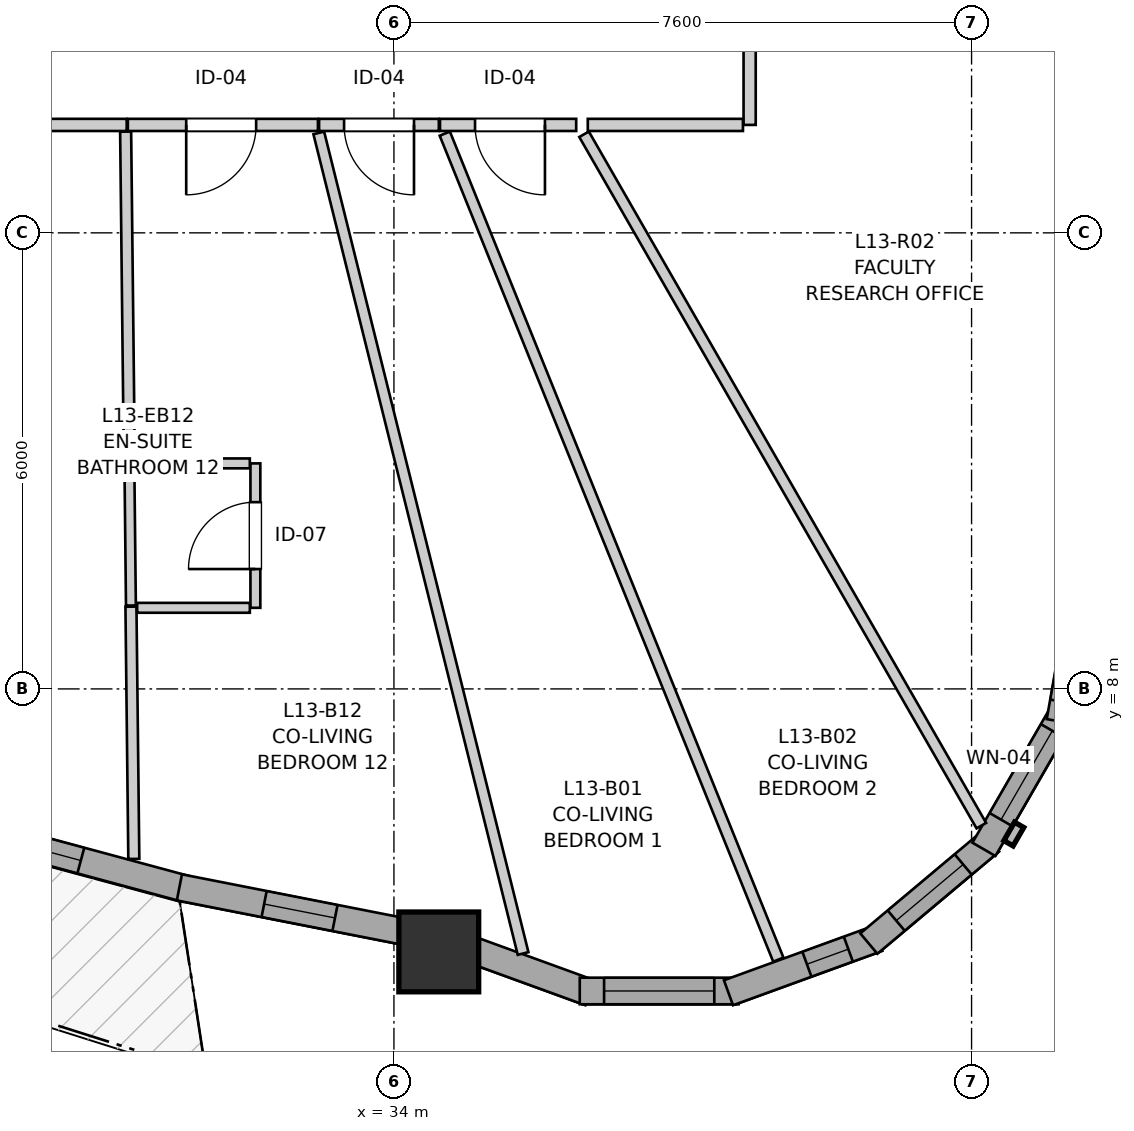
"""IFC4 building model, lengths in metres.
Left out: names, types, materials, properties, quantities, classifications, styles, units other than length and angle.
Written with IfcOpenShell. Run it as: python <this file> out.ifc"""

import sys

from ifc_helpers import new_model, si_unit, direction, frame, frame_2d, origin, origin_2d, place, context, subcontext, project, spatial, rectangle, extrude, source, transform, mapped, element, fill, save


model = new_model("IFC4")
c1 = context("Model", 3, precision=1e-05, world=origin(), true_north=direction((0.0, 1.0)))
c2 = subcontext(c1, "Body", "Model", "MODEL_VIEW")
j1 = project(units=[si_unit("LENGTHUNIT", "METRE"), si_unit("PLANEANGLEUNIT", "RADIAN")], contexts=[c1])
p1 = place(None, origin())
s1 = spatial("IfcSite", under=j1, at=p1, CompositionType="ELEMENT")
p2 = place(p1, origin())
s2 = spatial("IfcBuilding", under=s1, at=p2, CompositionType="ELEMENT")
p3 = place(p2, frame((0.0, 0.0, 46.2)))
s3 = spatial("IfcBuildingStorey", under=s2, at=p3, CompositionType="ELEMENT", Elevation=46.2)
m1 = source(origin(), c2, "Body", "SweptSolid", [
    extrude(rectangle(XDim=1.05, YDim=1.05, at=origin_2d()), origin(), (0.0, 0.0, 1.0), 2.94),
])
p4 = place(p3, frame((34.59, 4.54, 0.0), z_axis=(0.0, 0.0, 1.0), x_axis=(1.0, 0.0, 0.0)))
e1 = element("IfcColumn", 1, at=p4, inside=s3, PredefinedType="COLUMN", context=c2, shape_type="MappedRepresentation", body=[
    mapped(m1, transform((0.0, 0.0, 0.0), x_axis=(1.0, 0.0, 0.0), y_axis=(0.0, 1.0, 0.0), z_axis=(0.0, 0.0, 1.0), scale=1.0)),
])
p5 = place(p3, frame((27.961, 6.26, 0.0), z_axis=(0.0, 0.0, 1.0), x_axis=(0.96545566601, -0.260567375106, 0.0)))
e2 = element("IfcWall", 2, at=p5, inside=s3, PredefinedType="SOLIDWALL", context=c2, shape_type="SweptSolid", body=[
    extrude(rectangle(XDim=3.42, YDim=0.35, at=frame_2d((1.71, 0.0))), origin(), (0.0, 0.0, 1.0), 2.42),
])
p6 = place(p5, frame((0.738, 0.0, 0.82)))
e3 = element("IfcOpeningElement", 3, at=p6, cuts=e2, PredefinedType="OPENING", context=c2, shape_type="SweptSolid", body=[
    extrude(rectangle(XDim=1.25, YDim=1.35, at=frame_2d((0.625, 0.675))), frame((0.0, 0.185, 0.0), z_axis=(0.0, -1.0, 0.0), x_axis=(1.0, 0.0, 0.0)), (0.0, 0.0, 1.0), 0.37),
])
p7 = place(p3, frame((31.177, 5.389, 0.0), z_axis=(0.0, 0.0, 1.0), x_axis=(0.981235727687, -0.192811946491, 0.0)))
e4 = element("IfcWall", 4, at=p7, inside=s3, PredefinedType="SOLIDWALL", context=c2, shape_type="SweptSolid", body=[
    extrude(rectangle(XDim=3.212, YDim=0.35, at=frame_2d((1.606, 0.0))), origin(), (0.0, 0.0, 1.0), 2.42),
])
p8 = place(p7, frame((1.136, 0.0, 0.82)))
e5 = element("IfcOpeningElement", 5, at=p8, cuts=e4, PredefinedType="OPENING", context=c2, shape_type="SweptSolid", body=[
    extrude(rectangle(XDim=0.95, YDim=1.35, at=frame_2d((0.475, 0.675))), frame((0.0, 0.185, 0.0), z_axis=(0.0, -1.0, 0.0), x_axis=(1.0, 0.0, 0.0)), (0.0, 0.0, 1.0), 0.37),
])
p9 = place(p3, frame((34.932, 4.602, 0.0), z_axis=(0.0, 0.0, 1.0), x_axis=(0.939675390388, -0.342067479745, 0.0)))
e6 = element("IfcWall", 6, at=p9, inside=s3, PredefinedType="SOLIDWALL", context=c2, shape_type="SweptSolid", body=[
    extrude(rectangle(XDim=1.752, YDim=0.35, at=frame_2d((0.876, 0.0))), origin(), (0.0, 0.0, 1.0), 2.42),
])
p10 = place(p3, frame((36.445, 4.026, 0.0), z_axis=(0.0, 0.0, 1.0), x_axis=(1.0, 0.0, 0.0)))
e7 = element("IfcWall", 7, at=p10, inside=s3, PredefinedType="SOLIDWALL", context=c2, shape_type="SweptSolid", body=[
    extrude(rectangle(XDim=2.09, YDim=0.35, at=frame_2d((1.045, 0.0))), origin(), (0.0, 0.0, 1.0), 2.42),
])
p11 = place(p10, frame((0.32, 0.0, 0.82)))
e8 = element("IfcOpeningElement", 8, at=p11, cuts=e7, PredefinedType="OPENING", context=c2, shape_type="SweptSolid", body=[
    extrude(rectangle(XDim=1.45, YDim=1.25, at=frame_2d((0.725, 0.625))), frame((0.0, 0.185, 0.0), z_axis=(0.0, -1.0, 0.0), x_axis=(1.0, 0.0, 0.0)), (0.0, 0.0, 1.0), 0.37),
])
p12 = place(p3, frame((38.402, 4.002, 0.0), z_axis=(0.0, 0.0, 1.0), x_axis=(0.939711556618, 0.341968113072, 0.0)))
e9 = element("IfcWall", 9, at=p12, inside=s3, PredefinedType="SOLIDWALL", context=c2, shape_type="SweptSolid", body=[
    extrude(rectangle(XDim=2.09, YDim=0.35, at=frame_2d((1.045, 0.0))), origin(), (0.0, 0.0, 1.0), 2.42),
])
p13 = place(p12, frame((1.098, 0.0, 0.82)))
e10 = element("IfcOpeningElement", 10, at=p13, cuts=e9, PredefinedType="OPENING", context=c2, shape_type="SweptSolid", body=[
    extrude(rectangle(XDim=0.58, YDim=1.35, at=frame_2d((0.29, 0.675))), frame((0.0, 0.185, 0.0), z_axis=(0.0, -1.0, 0.0), x_axis=(1.0, 0.0, 0.0)), (0.0, 0.0, 1.0), 0.37),
])
p14 = place(p3, frame((40.248, 4.649, 0.0), z_axis=(0.0, 0.0, 1.0), x_axis=(0.766024572719, 0.642811289563, 0.0)))
e11 = element("IfcWall", 11, at=p14, inside=s3, PredefinedType="SOLIDWALL", context=c2, shape_type="SweptSolid", body=[
    extrude(rectangle(XDim=2.09, YDim=0.35, at=frame_2d((1.045, 0.0))), origin(), (0.0, 0.0, 1.0), 2.42),
])
p15 = place(p14, frame((0.47, 0.0, 0.82)))
e12 = element("IfcOpeningElement", 12, at=p15, cuts=e11, PredefinedType="OPENING", context=c2, shape_type="SweptSolid", body=[
    extrude(rectangle(XDim=1.15, YDim=1.2, at=frame_2d((0.575, 0.6))), frame((0.0, 0.185, 0.0), z_axis=(0.0, -1.0, 0.0), x_axis=(1.0, 0.0, 0.0)), (0.0, 0.0, 1.0), 0.37),
])
p16 = place(p3, frame((41.762, 5.889, 0.0), z_axis=(0.0, 0.0, 1.0), x_axis=(0.500046000743, 0.865998843614, 0.0)))
e13 = element("IfcWall", 13, at=p16, inside=s3, PredefinedType="SOLIDWALL", context=c2, shape_type="SweptSolid", body=[
    extrude(rectangle(XDim=2.09, YDim=0.35, at=frame_2d((1.045, 0.0))), origin(), (0.0, 0.0, 1.0), 2.42),
])
p17 = place(p16, frame((0.451, 0.0, 0.82)))
e14 = element("IfcOpeningElement", 14, at=p17, cuts=e13, PredefinedType="OPENING", context=c2, shape_type="SweptSolid", body=[
    extrude(rectangle(XDim=1.35, YDim=1.45, at=frame_2d((0.675, 0.725))), frame((0.0, 0.185, 0.0), z_axis=(0.0, -1.0, 0.0), x_axis=(1.0, 0.0, 0.0)), (0.0, 0.0, 1.0), 0.37),
])
p18 = place(p3, frame((42.761, 7.572, 0.0), z_axis=(0.0, 0.0, 1.0), x_axis=(0.17370309897, 0.984798067326, 0.0)))
e15 = element("IfcWall", 15, at=p18, inside=s3, PredefinedType="SOLIDWALL", context=c2, shape_type="SweptSolid", body=[
    extrude(rectangle(XDim=2.032, YDim=0.35, at=frame_2d((1.016, 0.0))), origin(), (0.0, 0.0, 1.0), 2.42),
])
p19 = place(p18, frame((0.261, 0.0, 0.82)))
e16 = element("IfcOpeningElement", 16, at=p19, cuts=e15, PredefinedType="OPENING", context=c2, shape_type="SweptSolid", body=[
    extrude(rectangle(XDim=1.45, YDim=1.25, at=frame_2d((0.725, 0.625))), frame((0.0, 0.185, 0.0), z_axis=(0.0, -1.0, 0.0), x_axis=(1.0, 0.0, 0.0)), (0.0, 0.0, 1.0), 0.37),
])
p20 = place(p3, frame((38.68, 21.086, 0.0), z_axis=(0.0, 0.0, 1.0), x_axis=(0.0, -1.0, 0.0)))
e17 = element("IfcWall", 17, at=p20, inside=s3, PredefinedType="PARTITIONING", context=c2, shape_type="SweptSolid", body=[
    extrude(rectangle(XDim=5.666, YDim=0.16, at=frame_2d((2.833, 0.0))), origin(), (0.0, 0.0, 1.0), 2.94),
])
p21 = place(p20, frame((2.362, 0.0, 0.0)))
e18 = element("IfcOpeningElement", 18, at=p21, cuts=e17, PredefinedType="OPENING", context=c2, shape_type="SweptSolid", body=[
    extrude(rectangle(XDim=0.96, YDim=2.1, at=frame_2d((0.48, 1.05))), frame((0.0, 0.09, 0.0), z_axis=(0.0, -1.0, 0.0), x_axis=(1.0, 0.0, 0.0)), (0.0, 0.0, 1.0), 0.18),
])
p22 = place(p3, frame((30.484, 15.42, 0.0), z_axis=(0.0, 0.0, 1.0), x_axis=(-1.0, 0.0, 0.0)))
e19 = element("IfcWall", 19, at=p22, inside=s3, PredefinedType="PARTITIONING", context=c2, shape_type="SweptSolid", body=[
    extrude(rectangle(XDim=2.925, YDim=0.16, at=frame_2d((1.462, 0.0))), origin(), (0.0, 0.0, 1.0), 2.94),
])
p23 = place(p22, frame((1.025, 0.0, 0.0)))
e20 = element("IfcOpeningElement", 20, at=p23, cuts=e19, PredefinedType="OPENING", context=c2, shape_type="SweptSolid", body=[
    extrude(rectangle(XDim=0.92, YDim=2.1, at=frame_2d((0.46, 1.05))), frame((0.0, 0.09, 0.0), z_axis=(0.0, -1.0, 0.0), x_axis=(1.0, 0.0, 0.0)), (0.0, 0.0, 1.0), 0.18),
])
p24 = place(p3, frame((33.0, 15.42, 0.0), z_axis=(0.0, 0.0, 1.0), x_axis=(-1.0, 0.0, 0.0)))
e21 = element("IfcWall", 21, at=p24, inside=s3, PredefinedType="PARTITIONING", context=c2, shape_type="SweptSolid", body=[
    extrude(rectangle(XDim=2.501, YDim=0.16, at=frame_2d((1.25, 0.0))), origin(), (0.0, 0.0, 1.0), 2.94),
])
p25 = place(p24, frame((0.813, 0.0, 0.0)))
e22 = element("IfcOpeningElement", 22, at=p25, cuts=e21, PredefinedType="OPENING", context=c2, shape_type="SweptSolid", body=[
    extrude(rectangle(XDim=0.92, YDim=2.1, at=frame_2d((0.46, 1.05))), frame((0.0, 0.09, 0.0), z_axis=(0.0, -1.0, 0.0), x_axis=(1.0, 0.0, 0.0)), (0.0, 0.0, 1.0), 0.18),
])
p26 = place(p3, frame((32.177, 9.067, 0.0), z_axis=(0.0, 0.0, 1.0), x_axis=(0.0, 1.0, 0.0)))
e23 = element("IfcWall", 23, at=p26, inside=s3, PredefinedType="PARTITIONING", context=c2, shape_type="SweptSolid", body=[
    extrude(rectangle(XDim=1.9, YDim=0.13, at=frame_2d((0.95, 0.0))), origin(), (0.0, 0.0, 1.0), 2.94),
])
p27 = place(p26, frame((0.51, 0.0, 0.0)))
e24 = element("IfcOpeningElement", 24, at=p27, cuts=e23, PredefinedType="OPENING", context=c2, shape_type="SweptSolid", body=[
    extrude(rectangle(XDim=0.88, YDim=2.05, at=frame_2d((0.44, 1.025))), frame((0.0, 0.075, 0.0), z_axis=(0.0, -1.0, 0.0), x_axis=(1.0, 0.0, 0.0)), (0.0, 0.0, 1.0), 0.15),
])
p28 = place(p3, frame((36.398, 15.42, 0.0), z_axis=(0.0, 0.0, 1.0), x_axis=(-1.0, 0.0, 0.0)))
e25 = element("IfcWall", 25, at=p28, inside=s3, PredefinedType="PARTITIONING", context=c2, shape_type="SweptSolid", body=[
    extrude(rectangle(XDim=1.792, YDim=0.16, at=frame_2d((0.896, 0.0))), origin(), (0.0, 0.0, 1.0), 2.94),
])
p29 = place(p28, frame((0.411, 0.0, 0.0)))
e26 = element("IfcOpeningElement", 26, at=p29, cuts=e25, PredefinedType="OPENING", context=c2, shape_type="SweptSolid", body=[
    extrude(rectangle(XDim=0.92, YDim=2.1, at=frame_2d((0.46, 1.05))), frame((0.0, 0.09, 0.0), z_axis=(0.0, -1.0, 0.0), x_axis=(1.0, 0.0, 0.0)), (0.0, 0.0, 1.0), 0.18),
])
p30 = place(p3, frame((34.591, 15.42, 0.0), z_axis=(0.0, 0.0, 1.0), x_axis=(-1.0, 0.0, 0.0)))
e27 = element("IfcWall", 27, at=p30, inside=s3, PredefinedType="PARTITIONING", context=c2, shape_type="SweptSolid", body=[
    extrude(rectangle(XDim=1.576, YDim=0.16, at=frame_2d((0.788, 0.0))), origin(), (0.0, 0.0, 1.0), 2.94),
])
p31 = place(p30, frame((0.327, 0.0, 0.0)))
e28 = element("IfcOpeningElement", 28, at=p31, cuts=e27, PredefinedType="OPENING", context=c2, shape_type="SweptSolid", body=[
    extrude(rectangle(XDim=0.92, YDim=2.1, at=frame_2d((0.46, 1.05))), frame((0.0, 0.09, 0.0), z_axis=(0.0, -1.0, 0.0), x_axis=(1.0, 0.0, 0.0)), (0.0, 0.0, 1.0), 0.18),
])
p32 = place(p3, frame((34.669, 15.305, 0.0), z_axis=(0.0, 0.0, 1.0), x_axis=(0.374459605158, -0.927243228126, 0.0)))
e29 = element("IfcWall", 29, at=p32, inside=s3, PredefinedType="PARTITIONING", context=c2, shape_type="SweptSolid", body=[
    extrude(rectangle(XDim=11.719, YDim=0.145, at=frame_2d((5.86, 0.0))), origin(), (0.0, 0.0, 1.0), 2.94),
])
p33 = place(p3, frame((33.011, 15.315, 0.0), z_axis=(0.0, 0.0, 1.0), x_axis=(0.241616400535, -0.970371843673, 0.0)))
e30 = element("IfcWall", 30, at=p33, inside=s3, PredefinedType="PARTITIONING", context=c2, shape_type="SweptSolid", body=[
    extrude(rectangle(XDim=11.125, YDim=0.145, at=frame_2d((5.562, 0.0))), origin(), (0.0, 0.0, 1.0), 2.94),
])
p34 = place(p3, frame((36.502, 15.297, 0.0), z_axis=(0.0, 0.0, 1.0), x_axis=(0.498240240214, -0.867039020478, 0.0)))
e31 = element("IfcWall", 31, at=p34, inside=s3, PredefinedType="PARTITIONING", context=c2, shape_type="SweptSolid", body=[
    extrude(rectangle(XDim=10.49, YDim=0.145, at=frame_2d((5.245, 0.0))), origin(), (0.0, 0.0, 1.0), 2.94),
])
p35 = place(p3, frame((30.47, 15.331, 0.0), z_axis=(0.0, 0.0, 1.0), x_axis=(0.011204559183, -0.999937226957, 0.0)))
e32 = element("IfcWall", 32, at=p35, inside=s3, PredefinedType="PARTITIONING", context=c2, shape_type="SweptSolid", body=[
    extrude(rectangle(XDim=4.38, YDim=0.145, at=frame_2d((2.19, 0.0))), origin(), (0.0, 0.0, 1.0), 2.94),
])
p36 = place(p3, frame((30.54, 9.082, 0.0), z_axis=(0.0, 0.0, 1.0), x_axis=(0.011329467055, -0.999935819529, 0.0)))
e33 = element("IfcWall", 33, at=p36, inside=s3, PredefinedType="PARTITIONING", context=c2, shape_type="SweptSolid", body=[
    extrude(rectangle(XDim=3.319, YDim=0.145, at=frame_2d((1.659, 0.0))), origin(), (0.0, 0.0, 1.0), 2.94),
])
p37 = place(p3, frame((36.551, 15.42, 0.0), z_axis=(0.0, 0.0, 1.0), x_axis=(1.0, 0.0, 0.0)))
e34 = element("IfcWall", 34, at=p37, inside=s3, PredefinedType="PARTITIONING", context=c2, shape_type="SweptSolid", body=[
    extrude(rectangle(XDim=2.042, YDim=0.16, at=frame_2d((1.021, 0.0))), origin(), (0.0, 0.0, 1.0), 2.94),
])
p38 = place(p3, frame((30.52, 10.937, 0.0), z_axis=(0.0, 0.0, 1.0), x_axis=(0.010879016503, -0.999940821749, 0.0)))
e35 = element("IfcWall", 35, at=p38, inside=s3, PredefinedType="PARTITIONING", context=c2, shape_type="SweptSolid", body=[
    extrude(rectangle(XDim=1.84, YDim=0.13, at=frame_2d((0.92, 0.0))), origin(), (0.0, 0.0, 1.0), 2.94),
])
p39 = place(p3, frame((30.6, 10.967, 0.0), z_axis=(0.0, 0.0, 1.0), x_axis=(1.0, 0.0, 0.0)))
e36 = element("IfcWall", 36, at=p39, inside=s3, PredefinedType="PARTITIONING", context=c2, shape_type="SweptSolid", body=[
    extrude(rectangle(XDim=1.504, YDim=0.13, at=frame_2d((0.752, 0.0))), origin(), (0.0, 0.0, 1.0), 2.94),
])
p40 = place(p3, frame((30.621, 9.067, 0.0), z_axis=(0.0, 0.0, 1.0), x_axis=(1.0, 0.0, 0.0)))
e37 = element("IfcWall", 37, at=p40, inside=s3, PredefinedType="PARTITIONING", context=c2, shape_type="SweptSolid", body=[
    extrude(rectangle(XDim=1.483, YDim=0.13, at=frame_2d((0.741, 0.0))), origin(), (0.0, 0.0, 1.0), 2.508),
])
m2 = source(origin(), c2, "Body", "SweptSolid", [
    extrude(rectangle(XDim=1.25, YDim=1.35, at=frame_2d((0.625, 0.675))), frame((0.0, 0.03, 0.0), z_axis=(0.0, -1.0, 0.0), x_axis=(1.0, 0.0, 0.0)), (0.0, 0.0, 1.0), 0.06),
])
p41 = place(p6, origin())
e38 = element("IfcWindow", 38, at=p41, inside=s3, PartitioningType="SINGLE_PANEL", PredefinedType="WINDOW", context=c2, shape_type="MappedRepresentation", body=[
    mapped(m2, transform((0.0, 0.0, 0.0), x_axis=(1.0, 0.0, 0.0), y_axis=(0.0, 1.0, 0.0), z_axis=(0.0, 0.0, 1.0), scale=1.0)),
])
fill(e3, e38)
m3 = source(origin(), c2, "Body", "SweptSolid", [
    extrude(rectangle(XDim=0.95, YDim=1.35, at=frame_2d((0.475, 0.675))), frame((0.0, 0.03, 0.0), z_axis=(0.0, -1.0, 0.0), x_axis=(1.0, 0.0, 0.0)), (0.0, 0.0, 1.0), 0.06),
])
p42 = place(p8, origin())
e39 = element("IfcWindow", 39, at=p42, inside=s3, PartitioningType="SINGLE_PANEL", PredefinedType="WINDOW", context=c2, shape_type="MappedRepresentation", body=[
    mapped(m3, transform((0.0, 0.0, 0.0), x_axis=(1.0, 0.0, 0.0), y_axis=(0.0, 1.0, 0.0), z_axis=(0.0, 0.0, 1.0), scale=1.0)),
])
fill(e5, e39)
m4 = source(origin(), c2, "Body", "SweptSolid", [
    extrude(rectangle(XDim=1.45, YDim=1.25, at=frame_2d((0.725, 0.625))), frame((0.0, 0.03, 0.0), z_axis=(0.0, -1.0, 0.0), x_axis=(1.0, 0.0, 0.0)), (0.0, 0.0, 1.0), 0.06),
])
p43 = place(p11, origin())
e40 = element("IfcWindow", 40, at=p43, inside=s3, PartitioningType="SINGLE_PANEL", PredefinedType="WINDOW", context=c2, shape_type="MappedRepresentation", body=[
    mapped(m4, transform((0.0, 0.0, 0.0), x_axis=(1.0, 0.0, 0.0), y_axis=(0.0, 1.0, 0.0), z_axis=(0.0, 0.0, 1.0), scale=1.0)),
])
fill(e8, e40)
m5 = source(origin(), c2, "Body", "SweptSolid", [
    extrude(rectangle(XDim=0.58, YDim=1.35, at=frame_2d((0.29, 0.675))), frame((0.0, 0.03, 0.0), z_axis=(0.0, -1.0, 0.0), x_axis=(1.0, 0.0, 0.0)), (0.0, 0.0, 1.0), 0.06),
])
p44 = place(p13, origin())
e41 = element("IfcWindow", 41, at=p44, inside=s3, PartitioningType="SINGLE_PANEL", PredefinedType="WINDOW", context=c2, shape_type="MappedRepresentation", body=[
    mapped(m5, transform((0.0, 0.0, 0.0), x_axis=(1.0, 0.0, 0.0), y_axis=(0.0, 1.0, 0.0), z_axis=(0.0, 0.0, 1.0), scale=1.0)),
])
fill(e10, e41)
m6 = source(origin(), c2, "Body", "SweptSolid", [
    extrude(rectangle(XDim=1.15, YDim=1.2, at=frame_2d((0.575, 0.6))), frame((0.0, 0.03, 0.0), z_axis=(0.0, -1.0, 0.0), x_axis=(1.0, 0.0, 0.0)), (0.0, 0.0, 1.0), 0.06),
])
p45 = place(p15, origin())
e42 = element("IfcWindow", 42, at=p45, inside=s3, PartitioningType="SINGLE_PANEL", PredefinedType="WINDOW", context=c2, shape_type="MappedRepresentation", body=[
    mapped(m6, transform((0.0, 0.0, 0.0), x_axis=(1.0, 0.0, 0.0), y_axis=(0.0, 1.0, 0.0), z_axis=(0.0, 0.0, 1.0), scale=1.0)),
])
fill(e12, e42)
m7 = source(origin(), c2, "Body", "SweptSolid", [
    extrude(rectangle(XDim=1.35, YDim=1.45, at=frame_2d((0.675, 0.725))), frame((0.0, 0.03, 0.0), z_axis=(0.0, -1.0, 0.0), x_axis=(1.0, 0.0, 0.0)), (0.0, 0.0, 1.0), 0.06),
])
p46 = place(p17, origin())
e43 = element("IfcWindow", 43, at=p46, inside=s3, PartitioningType="SINGLE_PANEL", PredefinedType="WINDOW", context=c2, shape_type="MappedRepresentation", body=[
    mapped(m7, transform((0.0, 0.0, 0.0), x_axis=(1.0, 0.0, 0.0), y_axis=(0.0, 1.0, 0.0), z_axis=(0.0, 0.0, 1.0), scale=1.0)),
])
fill(e14, e43)
m8 = source(origin(), c2, "Body", "SweptSolid", [
    extrude(rectangle(XDim=0.92, YDim=2.1, at=frame_2d((0.46, 1.05))), frame((0.0, 0.025, 0.0), z_axis=(0.0, -1.0, 0.0), x_axis=(1.0, 0.0, 0.0)), (0.0, 0.0, 1.0), 0.05),
])
p47 = place(p25, origin())
e44 = element("IfcDoor", 44, at=p47, inside=s3, OperationType="SINGLE_SWING_RIGHT", PredefinedType="DOOR", context=c2, shape_type="MappedRepresentation", body=[
    mapped(m8, transform((0.0, 0.0, 0.0), x_axis=(1.0, 0.0, 0.0), y_axis=(0.0, 1.0, 0.0), z_axis=(0.0, 0.0, 1.0), scale=1.0)),
])
fill(e22, e44)
m9 = source(origin(), c2, "Body", "SweptSolid", [
    extrude(rectangle(XDim=0.88, YDim=2.05, at=frame_2d((0.44, 1.025))), frame((0.0, 0.025, 0.0), z_axis=(0.0, -1.0, 0.0), x_axis=(1.0, 0.0, 0.0)), (0.0, 0.0, 1.0), 0.05),
])
p48 = place(p27, origin())
e45 = element("IfcDoor", 45, at=p48, inside=s3, OperationType="SINGLE_SWING_LEFT", PredefinedType="DOOR", context=c2, shape_type="MappedRepresentation", body=[
    mapped(m9, transform((0.0, 0.0, 0.0), x_axis=(1.0, 0.0, 0.0), y_axis=(0.0, 1.0, 0.0), z_axis=(0.0, 0.0, 1.0), scale=1.0)),
])
fill(e24, e45)
p49 = place(p29, origin())
e46 = element("IfcDoor", 46, at=p49, inside=s3, OperationType="SINGLE_SWING_LEFT", PredefinedType="DOOR", context=c2, shape_type="MappedRepresentation", body=[
    mapped(m8, transform((0.0, 0.0, 0.0), x_axis=(1.0, 0.0, 0.0), y_axis=(0.0, 1.0, 0.0), z_axis=(0.0, 0.0, 1.0), scale=1.0)),
])
fill(e26, e46)
p50 = place(p31, origin())
e47 = element("IfcDoor", 47, at=p50, inside=s3, OperationType="SINGLE_SWING_LEFT", PredefinedType="DOOR", context=c2, shape_type="MappedRepresentation", body=[
    mapped(m8, transform((0.0, 0.0, 0.0), x_axis=(1.0, 0.0, 0.0), y_axis=(0.0, 1.0, 0.0), z_axis=(0.0, 0.0, 1.0), scale=1.0)),
])
fill(e28, e47)
save(model, sys.argv[1])
